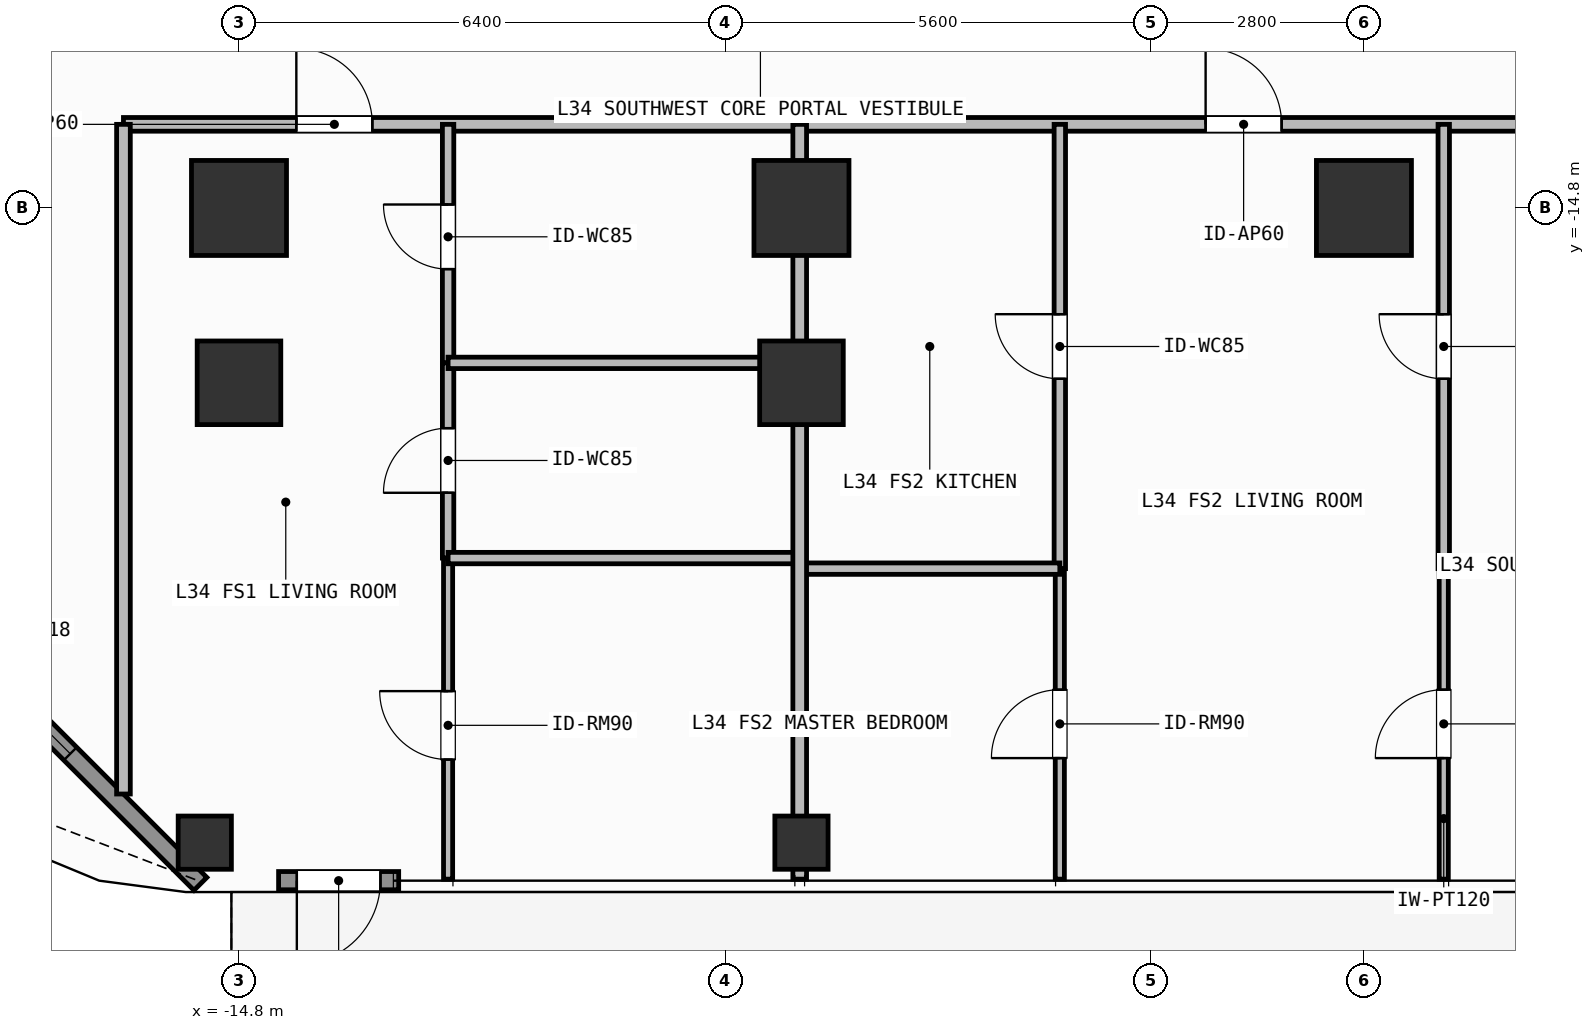
"""IFC4 building model, lengths in metres.
Left out: names, types, materials, properties, quantities, classifications, styles, units other than length and angle.
Written with IfcOpenShell. Run it as: python <this file> out.ifc"""

import sys

from ifc_helpers import new_model, si_unit, direction, frame, frame_2d, origin, origin_2d, place, context, subcontext, project, spatial, rectangle, hollow_rectangle, extrude, element, fill, save


model = new_model("IFC4")
c1 = context("Model", 3, precision=1e-05, world=origin(), true_north=direction((0.0, 1.0)))
c2 = subcontext(c1, "Body", "Model", "MODEL_VIEW")
j1 = project(units=[si_unit("LENGTHUNIT", "METRE"), si_unit("PLANEANGLEUNIT", "RADIAN")], contexts=[c1])
p1 = place(None, origin())
s1 = spatial("IfcSite", under=j1, at=p1, CompositionType="ELEMENT")
p2 = place(p1, origin())
s2 = spatial("IfcBuilding", under=s1, at=p2, CompositionType="ELEMENT")
p3 = place(p2, frame((0.0, 0.0, 136.8)))
s3 = spatial("IfcBuildingStorey", under=s2, at=p3, CompositionType="ELEMENT", Elevation=136.8)
for number, where, z_axis, x_axis in (
    (1, (-14.8, -14.8, 0.0), (0.0, 0.0, 1.0), (1.0, 0.0, 0.0)),
    (2, (-7.4, -14.8, 0.0), (0.0, 0.0, 1.0), (1.0, 0.0, 0.0)),
    (3, (0.0, -14.8, 0.0), (0.0, 0.0, 1.0), (1.0, 0.0, 0.0)),
):
    element("IfcColumn", number, at=place(p3, frame(where, z_axis=z_axis, x_axis=x_axis)), inside=s3, PredefinedType="COLUMN", context=c2, shape_type="SweptSolid", body=[
        extrude(rectangle(XDim=1.25, YDim=1.25, at=origin_2d()), origin(), (0.0, 0.0, 1.0), 3.9),
    ])
for number, where, z_axis, x_axis in (
    (4, (-14.8, -17.1, 0.0), (0.0, 0.0, 1.0), (1.0, 0.0, 0.0)),
    (5, (-7.4, -17.1, 0.0), (0.0, 0.0, 1.0), (1.0, 0.0, 0.0)),
):
    element("IfcColumn", number, at=place(p3, frame(where, z_axis=z_axis, x_axis=x_axis)), inside=s3, PredefinedType="COLUMN", context=c2, shape_type="SweptSolid", body=[
        extrude(rectangle(XDim=1.1, YDim=1.1, at=origin_2d()), origin(), (0.0, 0.0, 1.0), 3.9),
    ])
for number, where, z_axis, x_axis in (
    (6, (-15.25, -23.15, 0.0), (0.0, 0.0, 1.0), (1.0, 0.0, 0.0)),
    (7, (-7.4, -23.15, 0.0), (0.0, 0.0, 1.0), (1.0, 0.0, 0.0)),
):
    element("IfcColumn", number, at=place(p3, frame(where, z_axis=z_axis, x_axis=x_axis)), inside=s3, PredefinedType="COLUMN", context=c2, shape_type="SweptSolid", body=[
        extrude(hollow_rectangle(XDim=0.7, YDim=0.7, WallThickness=0.032, at=origin_2d()), origin(), (0.0, 0.0, 1.0), 3.9),
    ])
p4 = place(p3, frame((-12.699, -23.65, 0.0), z_axis=(0.0, 0.0, 1.0), x_axis=(-1.0, 0.0, 0.0)))
e8 = element("IfcWall", 8, at=p4, inside=s3, PredefinedType="SOLIDWALL", context=c2, shape_type="SweptSolid", body=[
    extrude(rectangle(XDim=1.58, YDim=0.24, at=frame_2d((0.79, 0.0))), origin(), (0.0, 0.0, 1.0), 3.68),
])
p5 = place(p4, frame((0.24, 0.0, 0.0)))
e9 = element("IfcOpeningElement", 9, at=p5, cuts=e8, PredefinedType="OPENING", context=c2, shape_type="SweptSolid", body=[
    extrude(rectangle(XDim=1.1, YDim=2.2, at=frame_2d((0.55, 1.1))), frame((0.0, 0.13, 0.0), z_axis=(0.0, -1.0, 0.0), x_axis=(1.0, 0.0, 0.0)), (0.0, 0.0, 1.0), 0.26),
])
p6 = place(p3, frame((-15.308, -23.692, 0.0), z_axis=(0.0, 0.0, 1.0), x_axis=(-0.707106781187, 0.707106781187, 0.0)))
e10 = element("IfcWall", 10, at=p6, inside=s3, PredefinedType="SOLIDWALL", context=c2, shape_type="SweptSolid", body=[
    extrude(rectangle(XDim=6.343, YDim=0.24, at=frame_2d((3.171, 0.0))), origin(), (0.0, 0.0, 1.0), 3.68),
])
p7 = place(p6, frame((2.421, 0.0, 0.8)))
e11 = element("IfcOpeningElement", 11, at=p7, cuts=e10, PredefinedType="OPENING", context=c2, shape_type="SweptSolid", body=[
    extrude(rectangle(XDim=1.5, YDim=1.85, at=frame_2d((0.75, 0.925))), frame((0.0, 0.13, 0.0), z_axis=(0.0, -1.0, 0.0), x_axis=(1.0, 0.0, 0.0)), (0.0, 0.0, 1.0), 0.26),
])
p8 = place(p3, frame((-16.32, -13.7, 0.0), z_axis=(0.0, 0.0, 1.0), x_axis=(1.0, 0.0, 0.0)))
e12 = element("IfcWall", 12, at=p8, inside=s3, PredefinedType="PARTITIONING", context=c2, shape_type="SweptSolid", body=[
    extrude(rectangle(XDim=8.897, YDim=0.18, at=frame_2d((4.448, 0.0))), origin(), (0.0, 0.0, 1.0), 3.68),
])
p9 = place(p8, frame((2.274, 0.0, 0.0)))
e13 = element("IfcOpeningElement", 13, at=p9, cuts=e12, PredefinedType="OPENING", context=c2, shape_type="SweptSolid", body=[
    extrude(rectangle(XDim=1.0, YDim=2.2, at=frame_2d((0.5, 1.1))), frame((0.0, 0.1, 0.0), z_axis=(0.0, -1.0, 0.0), x_axis=(1.0, 0.0, 0.0)), (0.0, 0.0, 1.0), 0.2),
])
p10 = place(p3, frame((-12.049, -16.838, 0.0), z_axis=(0.0, 0.0, 1.0), x_axis=(0.0, 1.0, 0.0)))
e14 = element("IfcWall", 14, at=p10, inside=s3, PredefinedType="PARTITIONING", context=c2, shape_type="SweptSolid", body=[
    extrude(rectangle(XDim=3.138, YDim=0.15, at=frame_2d((1.569, 0.0))), origin(), (0.0, 0.0, 1.0), 3.68),
])
p11 = place(p10, frame((1.233, 0.0, 0.0)))
e15 = element("IfcOpeningElement", 15, at=p11, cuts=e14, PredefinedType="OPENING", context=c2, shape_type="SweptSolid", body=[
    extrude(rectangle(XDim=0.85, YDim=2.1, at=frame_2d((0.425, 1.05))), frame((0.0, 0.085, 0.0), z_axis=(0.0, -1.0, 0.0), x_axis=(1.0, 0.0, 0.0)), (0.0, 0.0, 1.0), 0.17),
])
p12 = place(p3, frame((-12.049, -19.406, 0.0), z_axis=(0.0, 0.0, 1.0), x_axis=(0.0, 1.0, 0.0)))
e16 = element("IfcWall", 16, at=p12, inside=s3, PredefinedType="PARTITIONING", context=c2, shape_type="SweptSolid", body=[
    extrude(rectangle(XDim=2.568, YDim=0.15, at=frame_2d((1.284, 0.0))), origin(), (0.0, 0.0, 1.0), 3.68),
])
p13 = place(p12, frame((0.859, 0.0, 0.0)))
e17 = element("IfcOpeningElement", 17, at=p13, cuts=e16, PredefinedType="OPENING", context=c2, shape_type="SweptSolid", body=[
    extrude(rectangle(XDim=0.85, YDim=2.1, at=frame_2d((0.425, 1.05))), frame((0.0, 0.085, 0.0), z_axis=(0.0, -1.0, 0.0), x_axis=(1.0, 0.0, 0.0)), (0.0, 0.0, 1.0), 0.17),
])
p14 = place(p3, frame((-12.049, -23.63, 0.0), z_axis=(0.0, 0.0, 1.0), x_axis=(0.0, 1.0, 0.0)))
e18 = element("IfcWall", 18, at=p14, inside=s3, PredefinedType="PARTITIONING", context=c2, shape_type="SweptSolid", body=[
    extrude(rectangle(XDim=4.224, YDim=0.12, at=frame_2d((2.112, 0.0))), origin(), (0.0, 0.0, 1.0), 3.68),
])
p15 = place(p14, frame((1.573, 0.0, 0.0)))
e19 = element("IfcOpeningElement", 19, at=p15, cuts=e18, PredefinedType="OPENING", context=c2, shape_type="SweptSolid", body=[
    extrude(rectangle(XDim=0.9, YDim=2.1, at=frame_2d((0.45, 1.05))), frame((0.0, 0.07, 0.0), z_axis=(0.0, -1.0, 0.0), x_axis=(1.0, 0.0, 0.0)), (0.0, 0.0, 1.0), 0.14),
])
p16 = place(p3, frame((-7.423, -13.7, 0.0), z_axis=(0.0, 0.0, 1.0), x_axis=(1.0, 0.0, 0.0)))
e20 = element("IfcWall", 20, at=p16, inside=s3, PredefinedType="PARTITIONING", context=c2, shape_type="SweptSolid", body=[
    extrude(rectangle(XDim=11.323, YDim=0.18, at=frame_2d((5.662, 0.0))), origin(), (0.0, 0.0, 1.0), 3.68),
])
p17 = place(p16, frame((5.34, 0.0, 0.0)))
e21 = element("IfcOpeningElement", 21, at=p17, cuts=e20, PredefinedType="OPENING", context=c2, shape_type="SweptSolid", body=[
    extrude(rectangle(XDim=1.0, YDim=2.2, at=frame_2d((0.5, 1.1))), frame((0.0, 0.1, 0.0), z_axis=(0.0, -1.0, 0.0), x_axis=(1.0, 0.0, 0.0)), (0.0, 0.0, 1.0), 0.2),
])
p18 = place(p3, frame((-4.001, -19.545, 0.0), z_axis=(0.0, 0.0, 1.0), x_axis=(0.0, 1.0, 0.0)))
e22 = element("IfcWall", 22, at=p18, inside=s3, PredefinedType="PARTITIONING", context=c2, shape_type="SweptSolid", body=[
    extrude(rectangle(XDim=5.845, YDim=0.15, at=frame_2d((2.922, 0.0))), origin(), (0.0, 0.0, 1.0), 3.68),
])
p19 = place(p18, frame((2.498, 0.0, 0.0)))
e23 = element("IfcOpeningElement", 23, at=p19, cuts=e22, PredefinedType="OPENING", context=c2, shape_type="SweptSolid", body=[
    extrude(rectangle(XDim=0.85, YDim=2.1, at=frame_2d((0.425, 1.05))), frame((0.0, 0.085, 0.0), z_axis=(0.0, -1.0, 0.0), x_axis=(1.0, 0.0, 0.0)), (0.0, 0.0, 1.0), 0.17),
])
p20 = place(p3, frame((-4.001, -23.63, 0.0), z_axis=(0.0, 0.0, 1.0), x_axis=(0.0, 1.0, 0.0)))
e24 = element("IfcWall", 24, at=p20, inside=s3, PredefinedType="PARTITIONING", context=c2, shape_type="SweptSolid", body=[
    extrude(rectangle(XDim=4.085, YDim=0.12, at=frame_2d((2.042, 0.0))), origin(), (0.0, 0.0, 1.0), 3.68),
])
p21 = place(p20, frame((1.593, 0.0, 0.0)))
e25 = element("IfcOpeningElement", 25, at=p21, cuts=e24, PredefinedType="OPENING", context=c2, shape_type="SweptSolid", body=[
    extrude(rectangle(XDim=0.9, YDim=2.1, at=frame_2d((0.45, 1.05))), frame((0.0, 0.07, 0.0), z_axis=(0.0, -1.0, 0.0), x_axis=(1.0, 0.0, 0.0)), (0.0, 0.0, 1.0), 0.14),
])
p22 = place(p3, frame((1.05, -19.545, 0.0), z_axis=(0.0, 0.0, 1.0), x_axis=(0.0, 1.0, 0.0)))
e26 = element("IfcWall", 26, at=p22, inside=s3, PredefinedType="PARTITIONING", context=c2, shape_type="SweptSolid", body=[
    extrude(rectangle(XDim=5.845, YDim=0.15, at=frame_2d((2.922, 0.0))), origin(), (0.0, 0.0, 1.0), 3.68),
])
p23 = place(p22, frame((2.498, 0.0, 0.0)))
e27 = element("IfcOpeningElement", 27, at=p23, cuts=e26, PredefinedType="OPENING", context=c2, shape_type="SweptSolid", body=[
    extrude(rectangle(XDim=0.85, YDim=2.1, at=frame_2d((0.425, 1.05))), frame((0.0, 0.085, 0.0), z_axis=(0.0, -1.0, 0.0), x_axis=(1.0, 0.0, 0.0)), (0.0, 0.0, 1.0), 0.17),
])
p24 = place(p3, frame((1.05, -23.63, 0.0), z_axis=(0.0, 0.0, 1.0), x_axis=(0.0, 1.0, 0.0)))
e28 = element("IfcWall", 28, at=p24, inside=s3, PredefinedType="PARTITIONING", context=c2, shape_type="SweptSolid", body=[
    extrude(rectangle(XDim=4.085, YDim=0.12, at=frame_2d((2.042, 0.0))), origin(), (0.0, 0.0, 1.0), 3.68),
])
p25 = place(p24, frame((1.593, 0.0, 0.0)))
e29 = element("IfcOpeningElement", 29, at=p25, cuts=e28, PredefinedType="OPENING", context=c2, shape_type="SweptSolid", body=[
    extrude(rectangle(XDim=0.9, YDim=2.1, at=frame_2d((0.45, 1.05))), frame((0.0, 0.07, 0.0), z_axis=(0.0, -1.0, 0.0), x_axis=(1.0, 0.0, 0.0)), (0.0, 0.0, 1.0), 0.14),
])
p26 = place(p3, frame((-16.32, -22.51, 0.0), z_axis=(0.0, 0.0, 1.0), x_axis=(0.0, 1.0, 0.0)))
e30 = element("IfcWall", 30, at=p26, inside=s3, PredefinedType="PARTITIONING", context=c2, shape_type="SweptSolid", body=[
    extrude(rectangle(XDim=8.81, YDim=0.18, at=frame_2d((4.405, 0.0))), origin(), (0.0, 0.0, 1.0), 3.68),
])
p27 = place(p3, frame((-12.049, -16.838, 0.0), z_axis=(0.0, 0.0, 1.0), x_axis=(1.0, 0.0, 0.0)))
e31 = element("IfcWall", 31, at=p27, inside=s3, PredefinedType="PARTITIONING", context=c2, shape_type="SweptSolid", body=[
    extrude(rectangle(XDim=4.626, YDim=0.15, at=frame_2d((2.313, 0.0))), origin(), (0.0, 0.0, 1.0), 3.082),
])
p28 = place(p3, frame((-12.049, -19.406, 0.0), z_axis=(0.0, 0.0, 1.0), x_axis=(1.0, 0.0, 0.0)))
e32 = element("IfcWall", 32, at=p28, inside=s3, PredefinedType="PARTITIONING", context=c2, shape_type="SweptSolid", body=[
    extrude(rectangle(XDim=4.626, YDim=0.15, at=frame_2d((2.313, 0.0))), origin(), (0.0, 0.0, 1.0), 3.68),
])
p29 = place(p3, frame((-7.423, -19.545, 0.0), z_axis=(0.0, 0.0, 1.0), x_axis=(1.0, 0.0, 0.0)))
e33 = element("IfcWall", 33, at=p29, inside=s3, PredefinedType="PARTITIONING", context=c2, shape_type="SweptSolid", body=[
    extrude(rectangle(XDim=3.422, YDim=0.15, at=frame_2d((1.711, 0.0))), origin(), (0.0, 0.0, 1.0), 3.68),
])
p30 = place(p3, frame((1.05, -19.545, 0.0), z_axis=(0.0, 0.0, 1.0), x_axis=(1.0, 0.0, 0.0)))
e34 = element("IfcWall", 34, at=p30, inside=s3, PredefinedType="PARTITIONING", context=c2, shape_type="SweptSolid", body=[
    extrude(rectangle(XDim=2.85, YDim=0.15, at=frame_2d((1.425, 0.0))), origin(), (0.0, 0.0, 1.0), 3.68),
])
p31 = place(p3, frame((-7.423, -23.63, 0.0), z_axis=(0.0, 0.0, 1.0), x_axis=(0.0, 1.0, 0.0)))
e35 = element("IfcWall", 35, at=p31, inside=s3, PredefinedType="PARTITIONING", context=c2, shape_type="SweptSolid", body=[
    extrude(rectangle(XDim=9.93, YDim=0.18, at=frame_2d((4.965, 0.0))), origin(), (0.0, 0.0, 1.0), 3.082),
])
p32 = place(p5, origin())
e36 = element("IfcDoor", 36, at=p32, inside=s3, OperationType="SINGLE_SWING_RIGHT", PredefinedType="DOOR", context=c2, shape_type="SweptSolid", body=[
    extrude(rectangle(XDim=1.1, YDim=2.2, at=frame_2d((0.55, 1.1))), frame((0.0, 0.025, 0.0), z_axis=(0.0, -1.0, 0.0), x_axis=(1.0, 0.0, 0.0)), (0.0, 0.0, 1.0), 0.05),
])
fill(e9, e36)
p33 = place(p7, origin())
e37 = element("IfcWindow", 37, at=p33, inside=s3, PartitioningType="SINGLE_PANEL", PredefinedType="WINDOW", context=c2, shape_type="SweptSolid", body=[
    extrude(rectangle(XDim=1.5, YDim=1.85, at=frame_2d((0.75, 0.925))), frame((0.0, 0.03, 0.0), z_axis=(0.0, -1.0, 0.0), x_axis=(1.0, 0.0, 0.0)), (0.0, 0.0, 1.0), 0.06),
])
fill(e11, e37)
p34 = place(p9, origin())
e38 = element("IfcDoor", 38, at=p34, inside=s3, OperationType="SINGLE_SWING_LEFT", PredefinedType="DOOR", context=c2, shape_type="SweptSolid", body=[
    extrude(rectangle(XDim=1.0, YDim=2.2, at=frame_2d((0.5, 1.1))), frame((0.0, 0.025, 0.0), z_axis=(0.0, -1.0, 0.0), x_axis=(1.0, 0.0, 0.0)), (0.0, 0.0, 1.0), 0.05),
])
fill(e13, e38)
p35 = place(p11, origin())
e39 = element("IfcDoor", 39, at=p35, inside=s3, OperationType="SINGLE_SWING_RIGHT", PredefinedType="DOOR", context=c2, shape_type="SweptSolid", body=[
    extrude(rectangle(XDim=0.85, YDim=2.1, at=frame_2d((0.425, 1.05))), frame((0.0, 0.025, 0.0), z_axis=(0.0, -1.0, 0.0), x_axis=(1.0, 0.0, 0.0)), (0.0, 0.0, 1.0), 0.05),
])
fill(e15, e39)
p36 = place(p13, origin())
e40 = element("IfcDoor", 40, at=p36, inside=s3, OperationType="SINGLE_SWING_LEFT", PredefinedType="DOOR", context=c2, shape_type="SweptSolid", body=[
    extrude(rectangle(XDim=0.85, YDim=2.1, at=frame_2d((0.425, 1.05))), frame((0.0, 0.025, 0.0), z_axis=(0.0, -1.0, 0.0), x_axis=(1.0, 0.0, 0.0)), (0.0, 0.0, 1.0), 0.05),
])
fill(e17, e40)
p37 = place(p15, origin())
e41 = element("IfcDoor", 41, at=p37, inside=s3, OperationType="SINGLE_SWING_RIGHT", PredefinedType="DOOR", context=c2, shape_type="SweptSolid", body=[
    extrude(rectangle(XDim=0.9, YDim=2.1, at=frame_2d((0.45, 1.05))), frame((0.0, 0.025, 0.0), z_axis=(0.0, -1.0, 0.0), x_axis=(1.0, 0.0, 0.0)), (0.0, 0.0, 1.0), 0.05),
])
fill(e19, e41)
p38 = place(p17, origin())
e42 = element("IfcDoor", 42, at=p38, inside=s3, OperationType="SINGLE_SWING_LEFT", PredefinedType="DOOR", context=c2, shape_type="SweptSolid", body=[
    extrude(rectangle(XDim=1.0, YDim=2.2, at=frame_2d((0.5, 1.1))), frame((0.0, 0.025, 0.0), z_axis=(0.0, -1.0, 0.0), x_axis=(1.0, 0.0, 0.0)), (0.0, 0.0, 1.0), 0.05),
])
fill(e21, e42)
p39 = place(p19, origin())
e43 = element("IfcDoor", 43, at=p39, inside=s3, OperationType="SINGLE_SWING_RIGHT", PredefinedType="DOOR", context=c2, shape_type="SweptSolid", body=[
    extrude(rectangle(XDim=0.85, YDim=2.1, at=frame_2d((0.425, 1.05))), frame((0.0, 0.025, 0.0), z_axis=(0.0, -1.0, 0.0), x_axis=(1.0, 0.0, 0.0)), (0.0, 0.0, 1.0), 0.05),
])
fill(e23, e43)
p40 = place(p21, origin())
e44 = element("IfcDoor", 44, at=p40, inside=s3, OperationType="SINGLE_SWING_LEFT", PredefinedType="DOOR", context=c2, shape_type="SweptSolid", body=[
    extrude(rectangle(XDim=0.9, YDim=2.1, at=frame_2d((0.45, 1.05))), frame((0.0, 0.025, 0.0), z_axis=(0.0, -1.0, 0.0), x_axis=(1.0, 0.0, 0.0)), (0.0, 0.0, 1.0), 0.05),
])
fill(e25, e44)
p41 = place(p23, origin())
e45 = element("IfcDoor", 45, at=p41, inside=s3, OperationType="SINGLE_SWING_RIGHT", PredefinedType="DOOR", context=c2, shape_type="SweptSolid", body=[
    extrude(rectangle(XDim=0.85, YDim=2.1, at=frame_2d((0.425, 1.05))), frame((0.0, 0.025, 0.0), z_axis=(0.0, -1.0, 0.0), x_axis=(1.0, 0.0, 0.0)), (0.0, 0.0, 1.0), 0.05),
])
fill(e27, e45)
p42 = place(p25, origin())
e46 = element("IfcDoor", 46, at=p42, inside=s3, OperationType="SINGLE_SWING_LEFT", PredefinedType="DOOR", context=c2, shape_type="SweptSolid", body=[
    extrude(rectangle(XDim=0.9, YDim=2.1, at=frame_2d((0.45, 1.05))), frame((0.0, 0.025, 0.0), z_axis=(0.0, -1.0, 0.0), x_axis=(1.0, 0.0, 0.0)), (0.0, 0.0, 1.0), 0.05),
])
fill(e29, e46)
save(model, sys.argv[1])
